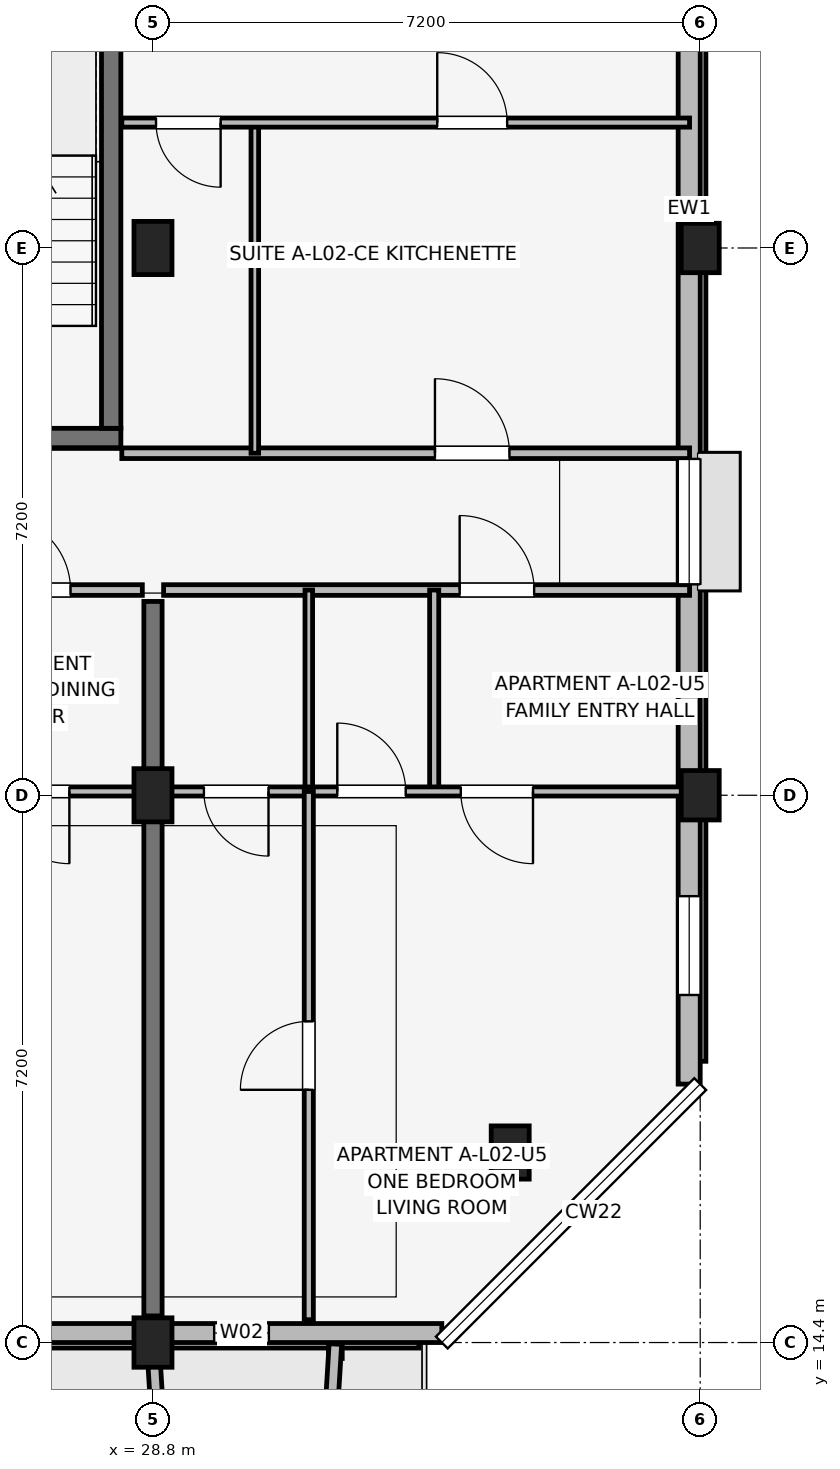
"""IFC4 building model, lengths in metres.
Left out: names, types, materials, properties, quantities, classifications, styles, units other than length and angle.
Written with IfcOpenShell. Run it as: python <this file> out.ifc"""

import sys

from ifc_helpers import new_model, si_unit, direction, frame, frame_2d, origin, origin_2d, place, context, subcontext, project, spatial, rectangle, extrude, element, fill, save


model = new_model("IFC4")
c1 = context("Model", 3, precision=1e-05, world=origin(), true_north=direction((0.0, 1.0)))
c2 = subcontext(c1, "Body", "Model", "MODEL_VIEW")
j1 = project(units=[si_unit("LENGTHUNIT", "METRE"), si_unit("PLANEANGLEUNIT", "RADIAN")], contexts=[c1])
p1 = place(None, origin())
s1 = spatial("IfcSite", under=j1, at=p1, CompositionType="ELEMENT")
p2 = place(p1, origin())
s2 = spatial("IfcBuilding", under=s1, at=p2, CompositionType="ELEMENT")
p3 = place(p2, frame((0.0, 0.0, 8.7)))
s3 = spatial("IfcBuildingStorey", under=s2, at=p3, CompositionType="ELEMENT", Elevation=8.7)
p4 = place(p3, frame((28.8, 14.4, 0.0), z_axis=(0.0, 0.0, 1.0), x_axis=(1.0, 0.0, 0.0)))
e1 = element("IfcColumn", 1, at=p4, inside=s3, PredefinedType="COLUMN", context=c2, shape_type="SweptSolid", body=[
    extrude(rectangle(XDim=0.5, YDim=0.65, at=origin_2d()), origin(), (0.0, 0.0, 1.0), 3.15),
])
for number, where, z_axis, x_axis in (
    (2, (28.8, 21.6, 0.0), (0.0, 0.0, 1.0), (1.0, 0.0, 0.0)),
    (3, (28.8, 28.8, 0.0), (0.0, 0.0, 1.0), (1.0, 0.0, 0.0)),
    (4, (33.5, 16.9, 0.0), (0.0, 0.0, 1.0), (1.0, 0.0, 0.0)),
):
    element("IfcColumn", number, at=place(p3, frame(where, z_axis=z_axis, x_axis=x_axis)), inside=s3, PredefinedType="COLUMN", context=c2, shape_type="SweptSolid", body=[
        extrude(rectangle(XDim=0.5, YDim=0.7, at=origin_2d()), origin(), (0.0, 0.0, 1.0), 3.15),
    ])
for number, where, z_axis, x_axis in (
    (5, (36.0, 21.6, 0.0), (0.0, 0.0, 1.0), (1.0, 0.0, 0.0)),
    (6, (36.0, 28.8, 0.0), (0.0, 0.0, 1.0), (1.0, 0.0, 0.0)),
):
    element("IfcColumn", number, at=place(p3, frame(where, z_axis=z_axis, x_axis=x_axis)), inside=s3, PredefinedType="COLUMN", context=c2, shape_type="SweptSolid", body=[
        extrude(rectangle(XDim=0.5, YDim=0.65, at=origin_2d()), origin(), (0.0, 0.0, 1.0), 3.15),
    ])
p5 = place(p3, frame((25.073, 26.3, 0.0), z_axis=(0.0, 0.0, 1.0), x_axis=(1.0, 0.0, 0.0)))
e7 = element("IfcWall", 7, at=p5, inside=s3, PredefinedType="SHEAR", context=c2, shape_type="SweptSolid", body=[
    extrude(rectangle(XDim=3.305, YDim=0.255, at=frame_2d((1.652, 0.0))), origin(), (0.0, 0.0, 1.0), 3.15),
])
p6 = place(p5, frame((1.127, 0.0, 0.0)))
e8 = element("IfcOpeningElement", 8, at=p6, cuts=e7, PredefinedType="OPENING", context=c2, shape_type="SweptSolid", body=[
    extrude(rectangle(XDim=1.05, YDim=2.12, at=frame_2d((0.525, 1.06))), frame((0.0, 0.137, 0.0), z_axis=(0.0, -1.0, 0.0), x_axis=(1.0, 0.0, 0.0)), (0.0, 0.0, 1.0), 0.275),
])
p7 = place(p3, frame((28.25, 26.427, 0.0), z_axis=(0.0, 0.0, 1.0), x_axis=(0.0, 1.0, 0.0)))
e9 = element("IfcWall", 9, at=p7, inside=s3, PredefinedType="SHEAR", context=c2, shape_type="SweptSolid", body=[
    extrude(rectangle(XDim=6.295, YDim=0.255, at=frame_2d((3.147, 0.0))), origin(), (0.0, 0.0, 1.0), 3.15),
])
p8 = place(p3, frame((28.8, 14.75, 0.0), z_axis=(0.0, 0.0, 1.0), x_axis=(0.0, 1.0, 0.0)))
e10 = element("IfcWall", 10, at=p8, inside=s3, PredefinedType="SHEAR", context=c2, shape_type="SweptSolid", body=[
    extrude(rectangle(XDim=9.4, YDim=0.24, at=frame_2d((4.7, 0.0))), origin(), (0.0, 0.0, 1.0), 3.15),
])
p9 = place(p3, frame((3.4, 14.525, 0.0), z_axis=(0.0, 0.0, 1.0), x_axis=(1.0, 0.0, 0.0)))
e11 = element("IfcWall", 11, at=p9, inside=s3, PredefinedType="SOLIDWALL", context=c2, shape_type="SweptSolid", body=[
    extrude(rectangle(XDim=29.2, YDim=0.25, at=frame_2d((14.6, 0.0))), origin(), (0.0, 0.0, 1.0), 2.43),
])
p10 = place(p9, frame((8.225, 0.0, 0.0), z_axis=(0.0, 0.0, 1.0), x_axis=(-1.0, 0.0, 0.0)))
e12 = element("IfcOpeningElement", 12, at=p10, cuts=e11, PredefinedType="OPENING", context=c2, shape_type="SweptSolid", body=[
    extrude(rectangle(XDim=1.65, YDim=2.15, at=frame_2d((0.825, 1.075))), frame((0.0, 0.135, 0.0), z_axis=(0.0, -1.0, 0.0), x_axis=(1.0, 0.0, 0.0)), (0.0, 0.0, 1.0), 0.27),
])
p11 = place(p9, frame((22.55, 0.0, 0.0), z_axis=(0.0, 0.0, 1.0), x_axis=(-1.0, 0.0, 0.0)))
e13 = element("IfcOpeningElement", 13, at=p11, cuts=e11, PredefinedType="OPENING", context=c2, shape_type="SweptSolid", body=[
    extrude(rectangle(XDim=1.5, YDim=2.15, at=frame_2d((0.75, 1.075))), frame((0.0, 0.135, 0.0), z_axis=(0.0, -1.0, 0.0), x_axis=(1.0, 0.0, 0.0)), (0.0, 0.0, 1.0), 0.27),
])
p12 = place(p9, frame((2.155, 0.0, 0.75)))
e14 = element("IfcOpeningElement", 14, at=p12, cuts=e11, PredefinedType="OPENING", context=c2, shape_type="SweptSolid", body=[
    extrude(rectangle(XDim=1.22, YDim=1.5, at=frame_2d((0.61, 0.75))), frame((0.0, 0.135, 0.0), z_axis=(0.0, -1.0, 0.0), x_axis=(1.0, 0.0, 0.0)), (0.0, 0.0, 1.0), 0.27),
])
p13 = place(p9, frame((4.39, 0.0, 0.75)))
e15 = element("IfcOpeningElement", 15, at=p13, cuts=e11, PredefinedType="OPENING", context=c2, shape_type="SweptSolid", body=[
    extrude(rectangle(XDim=1.34, YDim=1.55, at=frame_2d((0.67, 0.775))), frame((0.0, 0.135, 0.0), z_axis=(0.0, -1.0, 0.0), x_axis=(1.0, 0.0, 0.0)), (0.0, 0.0, 1.0), 0.27),
])
p14 = place(p9, frame((11.53, 0.0, 0.75)))
e16 = element("IfcOpeningElement", 16, at=p14, cuts=e11, PredefinedType="OPENING", context=c2, shape_type="SweptSolid", body=[
    extrude(rectangle(XDim=1.46, YDim=1.55, at=frame_2d((0.73, 0.775))), frame((0.0, 0.135, 0.0), z_axis=(0.0, -1.0, 0.0), x_axis=(1.0, 0.0, 0.0)), (0.0, 0.0, 1.0), 0.27),
])
p15 = place(p9, frame((13.74, 0.0, 0.7)))
e17 = element("IfcOpeningElement", 17, at=p15, cuts=e11, PredefinedType="OPENING", context=c2, shape_type="SweptSolid", body=[
    extrude(rectangle(XDim=1.72, YDim=1.6, at=frame_2d((0.86, 0.8))), frame((0.0, 0.135, 0.0), z_axis=(0.0, -1.0, 0.0), x_axis=(1.0, 0.0, 0.0)), (0.0, 0.0, 1.0), 0.27),
])
p16 = place(p9, frame((26.205, 0.0, 0.75)))
e18 = element("IfcOpeningElement", 18, at=p16, cuts=e11, PredefinedType="OPENING", context=c2, shape_type="SweptSolid", body=[
    extrude(rectangle(XDim=0.72, YDim=1.35, at=frame_2d((0.36, 0.675))), frame((0.0, 0.135, 0.0), z_axis=(0.0, -1.0, 0.0), x_axis=(1.0, 0.0, 0.0)), (0.0, 0.0, 1.0), 0.27),
])
p17 = place(p3, frame((35.855, 17.8, 0.0), z_axis=(0.0, 0.0, 1.0), x_axis=(0.0, 1.0, 0.0)))
e19 = element("IfcWall", 19, at=p17, inside=s3, PredefinedType="SOLIDWALL", context=c2, shape_type="SweptSolid", body=[
    extrude(rectangle(XDim=14.8, YDim=0.29, at=frame_2d((7.4, 0.0))), origin(), (0.0, 0.0, 1.0), 2.38),
])
p18 = place(p17, frame((6.575, 0.0, 1.05)))
e20 = element("IfcOpeningElement", 20, at=p18, cuts=e19, PredefinedType="OPENING", context=c2, shape_type="SweptSolid", body=[
    extrude(rectangle(XDim=1.65, YDim=1.15, at=frame_2d((0.825, 0.575))), frame((0.0, 0.155, 0.0), z_axis=(0.0, -1.0, 0.0), x_axis=(1.0, 0.0, 0.0)), (0.0, 0.0, 1.0), 0.31),
])
p19 = place(p17, frame((1.173, 0.0, 0.72)))
e21 = element("IfcOpeningElement", 21, at=p19, cuts=e19, PredefinedType="OPENING", context=c2, shape_type="SweptSolid", body=[
    extrude(rectangle(XDim=1.3, YDim=1.55, at=frame_2d((0.65, 0.775))), frame((0.0, 0.155, 0.0), z_axis=(0.0, -1.0, 0.0), x_axis=(1.0, 0.0, 0.0)), (0.0, 0.0, 1.0), 0.31),
])
for number, where, z_axis, x_axis in (
    (22, (28.8, 14.38, 0.0), (0.0, 0.0, 1.0), (0.061, -0.998, 0.0)),
    (23, (31.2, 14.38, 0.0), (0.0, 0.0, 1.0), (-0.061, -0.998, 0.0)),
):
    element("IfcWall", number, at=place(p3, frame(where, z_axis=z_axis, x_axis=x_axis)), inside=s3, PredefinedType="ELEMENTEDWALL", context=c2, shape_type="SweptSolid", body=[
        extrude(rectangle(XDim=1.964, YDim=0.165, at=frame_2d((0.982, 0.0))), origin(), (0.0, 0.0, 1.0), 2.95),
    ])
p20 = place(p3, frame((21.74, 24.3, 0.0), z_axis=(0.0, 0.0, 1.0), x_axis=(1.0, 0.0, 0.0)))
e24 = element("IfcWall", 24, at=p20, inside=s3, PredefinedType="PARTITIONING", context=c2, shape_type="SweptSolid", body=[
    extrude(rectangle(XDim=6.92, YDim=0.14, at=frame_2d((3.46, 0.0))), origin(), (0.0, 0.0, 1.0), 2.38),
])
p21 = place(p20, frame((4.995, 0.0, 0.0)))
e25 = element("IfcOpeningElement", 25, at=p21, cuts=e24, PredefinedType="OPENING", context=c2, shape_type="SweptSolid", body=[
    extrude(rectangle(XDim=0.98, YDim=2.1, at=frame_2d((0.49, 1.05))), frame((0.0, 0.08, 0.0), z_axis=(0.0, -1.0, 0.0), x_axis=(1.0, 0.0, 0.0)), (0.0, 0.0, 1.0), 0.16),
])
p22 = place(p3, frame((21.74, 21.65, 0.0), z_axis=(0.0, 0.0, 1.0), x_axis=(1.0, 0.0, 0.0)))
e26 = element("IfcWall", 26, at=p22, inside=s3, PredefinedType="PARTITIONING", context=c2, shape_type="SweptSolid", body=[
    extrude(rectangle(XDim=6.92, YDim=0.12, at=frame_2d((3.46, 0.0))), origin(), (0.0, 0.0, 1.0), 2.375),
])
p23 = place(p22, frame((1.475, 0.0, 0.0), z_axis=(0.0, 0.0, 1.0), x_axis=(-1.0, 0.0, 0.0)))
e27 = element("IfcOpeningElement", 27, at=p23, cuts=e26, PredefinedType="OPENING", context=c2, shape_type="SweptSolid", body=[
    extrude(rectangle(XDim=0.85, YDim=2.08, at=frame_2d((0.425, 1.04))), frame((0.0, 0.07, 0.0), z_axis=(0.0, -1.0, 0.0), x_axis=(1.0, 0.0, 0.0)), (0.0, 0.0, 1.0), 0.14),
])
p24 = place(p22, frame((2.625, 0.0, 0.0)))
e28 = element("IfcOpeningElement", 28, at=p24, cuts=e26, PredefinedType="OPENING", context=c2, shape_type="SweptSolid", body=[
    extrude(rectangle(XDim=0.9, YDim=2.08, at=frame_2d((0.45, 1.04))), frame((0.0, 0.07, 0.0), z_axis=(0.0, -1.0, 0.0), x_axis=(1.0, 0.0, 0.0)), (0.0, 0.0, 1.0), 0.14),
])
p25 = place(p22, frame((5.96, 0.0, 0.0), z_axis=(0.0, 0.0, 1.0), x_axis=(-1.0, 0.0, 0.0)))
e29 = element("IfcOpeningElement", 29, at=p25, cuts=e26, PredefinedType="OPENING", context=c2, shape_type="SweptSolid", body=[
    extrude(rectangle(XDim=0.95, YDim=2.08, at=frame_2d((0.475, 1.04))), frame((0.0, 0.07, 0.0), z_axis=(0.0, -1.0, 0.0), x_axis=(1.0, 0.0, 0.0)), (0.0, 0.0, 1.0), 0.14),
])
p26 = place(p3, frame((28.94, 24.3, 0.0), z_axis=(0.0, 0.0, 1.0), x_axis=(1.0, 0.0, 0.0)))
e30 = element("IfcWall", 30, at=p26, inside=s3, PredefinedType="PARTITIONING", context=c2, shape_type="SweptSolid", body=[
    extrude(rectangle(XDim=6.92, YDim=0.14, at=frame_2d((3.46, 0.0))), origin(), (0.0, 0.0, 1.0), 2.38),
])
p27 = place(p26, frame((3.895, 0.0, 0.0)))
e31 = element("IfcOpeningElement", 31, at=p27, cuts=e30, PredefinedType="OPENING", context=c2, shape_type="SweptSolid", body=[
    extrude(rectangle(XDim=0.98, YDim=2.1, at=frame_2d((0.49, 1.05))), frame((0.0, 0.08, 0.0), z_axis=(0.0, -1.0, 0.0), x_axis=(1.0, 0.0, 0.0)), (0.0, 0.0, 1.0), 0.16),
])
p28 = place(p3, frame((30.85, 21.65, 0.0), z_axis=(0.0, 0.0, 1.0), x_axis=(0.0, 1.0, 0.0)))
e32 = element("IfcWall", 32, at=p28, inside=s3, PredefinedType="PARTITIONING", context=c2, shape_type="SweptSolid", body=[
    extrude(rectangle(XDim=2.65, YDim=0.1, at=frame_2d((1.325, 0.0))), origin(), (0.0, 0.0, 1.0), 2.375),
])
p29 = place(p3, frame((32.5, 21.65, 0.0), z_axis=(0.0, 0.0, 1.0), x_axis=(0.0, 1.0, 0.0)))
e33 = element("IfcWall", 33, at=p29, inside=s3, PredefinedType="PARTITIONING", context=c2, shape_type="SweptSolid", body=[
    extrude(rectangle(XDim=2.65, YDim=0.12, at=frame_2d((1.325, 0.0))), origin(), (0.0, 0.0, 1.0), 2.375),
])
p30 = place(p3, frame((28.94, 21.65, 0.0), z_axis=(0.0, 0.0, 1.0), x_axis=(1.0, 0.0, 0.0)))
e34 = element("IfcWall", 34, at=p30, inside=s3, PredefinedType="PARTITIONING", context=c2, shape_type="SweptSolid", body=[
    extrude(rectangle(XDim=6.92, YDim=0.12, at=frame_2d((3.46, 0.0))), origin(), (0.0, 0.0, 1.0), 2.375),
])
p31 = place(p30, frame((1.38, 0.0, 0.0), z_axis=(0.0, 0.0, 1.0), x_axis=(-1.0, 0.0, 0.0)))
e35 = element("IfcOpeningElement", 35, at=p31, cuts=e34, PredefinedType="OPENING", context=c2, shape_type="SweptSolid", body=[
    extrude(rectangle(XDim=0.85, YDim=2.08, at=frame_2d((0.425, 1.04))), frame((0.0, 0.07, 0.0), z_axis=(0.0, -1.0, 0.0), x_axis=(1.0, 0.0, 0.0)), (0.0, 0.0, 1.0), 0.14),
])
p32 = place(p30, frame((2.285, 0.0, 0.0)))
e36 = element("IfcOpeningElement", 36, at=p32, cuts=e34, PredefinedType="OPENING", context=c2, shape_type="SweptSolid", body=[
    extrude(rectangle(XDim=0.9, YDim=2.08, at=frame_2d((0.45, 1.04))), frame((0.0, 0.07, 0.0), z_axis=(0.0, -1.0, 0.0), x_axis=(1.0, 0.0, 0.0)), (0.0, 0.0, 1.0), 0.14),
])
p33 = place(p30, frame((4.86, 0.0, 0.0), z_axis=(0.0, 0.0, 1.0), x_axis=(-1.0, 0.0, 0.0)))
e37 = element("IfcOpeningElement", 37, at=p33, cuts=e34, PredefinedType="OPENING", context=c2, shape_type="SweptSolid", body=[
    extrude(rectangle(XDim=0.95, YDim=2.08, at=frame_2d((0.475, 1.04))), frame((0.0, 0.07, 0.0), z_axis=(0.0, -1.0, 0.0), x_axis=(1.0, 0.0, 0.0)), (0.0, 0.0, 1.0), 0.14),
])
p34 = place(p3, frame((30.85, 14.7, 0.0), z_axis=(0.0, 0.0, 1.0), x_axis=(0.0, 1.0, 0.0)))
e38 = element("IfcWall", 38, at=p34, inside=s3, PredefinedType="PARTITIONING", context=c2, shape_type="SweptSolid", body=[
    extrude(rectangle(XDim=6.95, YDim=0.12, at=frame_2d((3.475, 0.0))), origin(), (0.0, 0.0, 1.0), 2.375),
])
p35 = place(p34, frame((3.025, 0.0, 0.0)))
e39 = element("IfcOpeningElement", 39, at=p35, cuts=e38, PredefinedType="OPENING", context=c2, shape_type="SweptSolid", body=[
    extrude(rectangle(XDim=0.9, YDim=2.08, at=frame_2d((0.45, 1.04))), frame((0.0, 0.07, 0.0), z_axis=(0.0, -1.0, 0.0), x_axis=(1.0, 0.0, 0.0)), (0.0, 0.0, 1.0), 0.14),
])
p36 = place(p3, frame((28.39, 26.1, 0.0), z_axis=(0.0, 0.0, 1.0), x_axis=(1.0, 0.0, 0.0)))
e40 = element("IfcWall", 40, at=p36, inside=s3, PredefinedType="PARTITIONING", context=c2, shape_type="SweptSolid", body=[
    extrude(rectangle(XDim=7.47, YDim=0.14, at=frame_2d((3.735, 0.0))), origin(), (0.0, 0.0, 1.0), 2.38),
])
p37 = place(p36, frame((4.12, 0.0, 0.0)))
e41 = element("IfcOpeningElement", 41, at=p37, cuts=e40, PredefinedType="OPENING", context=c2, shape_type="SweptSolid", body=[
    extrude(rectangle(XDim=0.98, YDim=2.1, at=frame_2d((0.49, 1.05))), frame((0.0, 0.08, 0.0), z_axis=(0.0, -1.0, 0.0), x_axis=(1.0, 0.0, 0.0)), (0.0, 0.0, 1.0), 0.16),
])
p38 = place(p3, frame((30.14, 26.1, 0.0), z_axis=(0.0, 0.0, 1.0), x_axis=(0.0, 1.0, 0.0)))
e42 = element("IfcWall", 42, at=p38, inside=s3, PredefinedType="PARTITIONING", context=c2, shape_type="SweptSolid", body=[
    extrude(rectangle(XDim=4.35, YDim=0.1, at=frame_2d((2.175, 0.0))), origin(), (0.0, 0.0, 1.0), 2.375),
])
p39 = place(p3, frame((28.39, 30.45, 0.0), z_axis=(0.0, 0.0, 1.0), x_axis=(1.0, 0.0, 0.0)))
e43 = element("IfcWall", 43, at=p39, inside=s3, PredefinedType="PARTITIONING", context=c2, shape_type="SweptSolid", body=[
    extrude(rectangle(XDim=7.47, YDim=0.12, at=frame_2d((3.735, 0.0))), origin(), (0.0, 0.0, 1.0), 2.38),
])
p40 = place(p39, frame((1.3, 0.0, 0.0), z_axis=(0.0, 0.0, 1.0), x_axis=(-1.0, 0.0, 0.0)))
e44 = element("IfcOpeningElement", 44, at=p40, cuts=e43, PredefinedType="OPENING", context=c2, shape_type="SweptSolid", body=[
    extrude(rectangle(XDim=0.85, YDim=2.08, at=frame_2d((0.425, 1.04))), frame((0.0, 0.07, 0.0), z_axis=(0.0, -1.0, 0.0), x_axis=(1.0, 0.0, 0.0)), (0.0, 0.0, 1.0), 0.14),
])
p41 = place(p39, frame((4.15, 0.0, 0.0)))
e45 = element("IfcOpeningElement", 45, at=p41, cuts=e43, PredefinedType="OPENING", context=c2, shape_type="SweptSolid", body=[
    extrude(rectangle(XDim=0.92, YDim=2.08, at=frame_2d((0.46, 1.04))), frame((0.0, 0.07, 0.0), z_axis=(0.0, -1.0, 0.0), x_axis=(1.0, 0.0, 0.0)), (0.0, 0.0, 1.0), 0.14),
])
p42 = place(p16, origin())
e46 = element("IfcWindow", 46, at=p42, inside=s3, PartitioningType="SINGLE_PANEL", PredefinedType="WINDOW", context=c2, shape_type="SweptSolid", body=[
    extrude(rectangle(XDim=0.72, YDim=1.35, at=frame_2d((0.36, 0.675))), frame((0.0, 0.03, 0.0), z_axis=(0.0, -1.0, 0.0), x_axis=(1.0, 0.0, 0.0)), (0.0, 0.0, 1.0), 0.06),
])
fill(e18, e46)
p43 = place(p18, origin())
e47 = element("IfcWindow", 47, at=p43, inside=s3, PartitioningType="SINGLE_PANEL", PredefinedType="WINDOW", context=c2, shape_type="SweptSolid", body=[
    extrude(rectangle(XDim=1.65, YDim=1.15, at=frame_2d((0.825, 0.575))), frame((0.0, 0.03, 0.0), z_axis=(0.0, -1.0, 0.0), x_axis=(1.0, 0.0, 0.0)), (0.0, 0.0, 1.0), 0.06),
])
fill(e20, e47)
p44 = place(p19, origin())
e48 = element("IfcWindow", 48, at=p44, inside=s3, PartitioningType="SINGLE_PANEL", PredefinedType="WINDOW", context=c2, shape_type="SweptSolid", body=[
    extrude(rectangle(XDim=1.3, YDim=1.55, at=frame_2d((0.65, 0.775))), frame((0.0, 0.03, 0.0), z_axis=(0.0, -1.0, 0.0), x_axis=(1.0, 0.0, 0.0)), (0.0, 0.0, 1.0), 0.06),
])
fill(e21, e48)
p45 = place(p21, origin())
e49 = element("IfcDoor", 49, at=p45, inside=s3, OperationType="SINGLE_SWING_LEFT", PredefinedType="DOOR", context=c2, shape_type="SweptSolid", body=[
    extrude(rectangle(XDim=0.98, YDim=2.1, at=frame_2d((0.49, 1.05))), frame((0.0, 0.025, 0.0), z_axis=(0.0, -1.0, 0.0), x_axis=(1.0, 0.0, 0.0)), (0.0, 0.0, 1.0), 0.05),
])
fill(e25, e49)
p46 = place(p25, origin())
e50 = element("IfcDoor", 50, at=p46, inside=s3, OperationType="SINGLE_SWING_RIGHT", PredefinedType="DOOR", context=c2, shape_type="SweptSolid", body=[
    extrude(rectangle(XDim=0.95, YDim=2.08, at=frame_2d((0.475, 1.04))), frame((0.0, 0.025, 0.0), z_axis=(0.0, -1.0, 0.0), x_axis=(1.0, 0.0, 0.0)), (0.0, 0.0, 1.0), 0.05),
])
fill(e29, e50)
p47 = place(p27, origin())
e51 = element("IfcDoor", 51, at=p47, inside=s3, OperationType="SINGLE_SWING_LEFT", PredefinedType="DOOR", context=c2, shape_type="SweptSolid", body=[
    extrude(rectangle(XDim=0.98, YDim=2.1, at=frame_2d((0.49, 1.05))), frame((0.0, 0.025, 0.0), z_axis=(0.0, -1.0, 0.0), x_axis=(1.0, 0.0, 0.0)), (0.0, 0.0, 1.0), 0.05),
])
fill(e31, e51)
p48 = place(p31, origin())
e52 = element("IfcDoor", 52, at=p48, inside=s3, OperationType="SINGLE_SWING_RIGHT", PredefinedType="DOOR", context=c2, shape_type="SweptSolid", body=[
    extrude(rectangle(XDim=0.85, YDim=2.08, at=frame_2d((0.425, 1.04))), frame((0.0, 0.025, 0.0), z_axis=(0.0, -1.0, 0.0), x_axis=(1.0, 0.0, 0.0)), (0.0, 0.0, 1.0), 0.05),
])
fill(e35, e52)
p49 = place(p32, origin())
e53 = element("IfcDoor", 53, at=p49, inside=s3, OperationType="SINGLE_SWING_LEFT", PredefinedType="DOOR", context=c2, shape_type="SweptSolid", body=[
    extrude(rectangle(XDim=0.9, YDim=2.08, at=frame_2d((0.45, 1.04))), frame((0.0, 0.025, 0.0), z_axis=(0.0, -1.0, 0.0), x_axis=(1.0, 0.0, 0.0)), (0.0, 0.0, 1.0), 0.05),
])
fill(e36, e53)
p50 = place(p33, origin())
e54 = element("IfcDoor", 54, at=p50, inside=s3, OperationType="SINGLE_SWING_RIGHT", PredefinedType="DOOR", context=c2, shape_type="SweptSolid", body=[
    extrude(rectangle(XDim=0.95, YDim=2.08, at=frame_2d((0.475, 1.04))), frame((0.0, 0.025, 0.0), z_axis=(0.0, -1.0, 0.0), x_axis=(1.0, 0.0, 0.0)), (0.0, 0.0, 1.0), 0.05),
])
fill(e37, e54)
p51 = place(p35, origin())
e55 = element("IfcDoor", 55, at=p51, inside=s3, OperationType="SINGLE_SWING_LEFT", PredefinedType="DOOR", context=c2, shape_type="SweptSolid", body=[
    extrude(rectangle(XDim=0.9, YDim=2.08, at=frame_2d((0.45, 1.04))), frame((0.0, 0.025, 0.0), z_axis=(0.0, -1.0, 0.0), x_axis=(1.0, 0.0, 0.0)), (0.0, 0.0, 1.0), 0.05),
])
fill(e39, e55)
p52 = place(p37, origin())
e56 = element("IfcDoor", 56, at=p52, inside=s3, OperationType="SINGLE_SWING_LEFT", PredefinedType="DOOR", context=c2, shape_type="SweptSolid", body=[
    extrude(rectangle(XDim=0.98, YDim=2.1, at=frame_2d((0.49, 1.05))), frame((0.0, 0.025, 0.0), z_axis=(0.0, -1.0, 0.0), x_axis=(1.0, 0.0, 0.0)), (0.0, 0.0, 1.0), 0.05),
])
fill(e41, e56)
p53 = place(p40, origin())
e57 = element("IfcDoor", 57, at=p53, inside=s3, OperationType="SINGLE_SWING_RIGHT", PredefinedType="DOOR", context=c2, shape_type="SweptSolid", body=[
    extrude(rectangle(XDim=0.85, YDim=2.08, at=frame_2d((0.425, 1.04))), frame((0.0, 0.025, 0.0), z_axis=(0.0, -1.0, 0.0), x_axis=(1.0, 0.0, 0.0)), (0.0, 0.0, 1.0), 0.05),
])
fill(e44, e57)
p54 = place(p41, origin())
e58 = element("IfcDoor", 58, at=p54, inside=s3, OperationType="SINGLE_SWING_LEFT", PredefinedType="DOOR", context=c2, shape_type="SweptSolid", body=[
    extrude(rectangle(XDim=0.92, YDim=2.08, at=frame_2d((0.46, 1.04))), frame((0.0, 0.025, 0.0), z_axis=(0.0, -1.0, 0.0), x_axis=(1.0, 0.0, 0.0)), (0.0, 0.0, 1.0), 0.05),
])
fill(e45, e58)
save(model, sys.argv[1])
